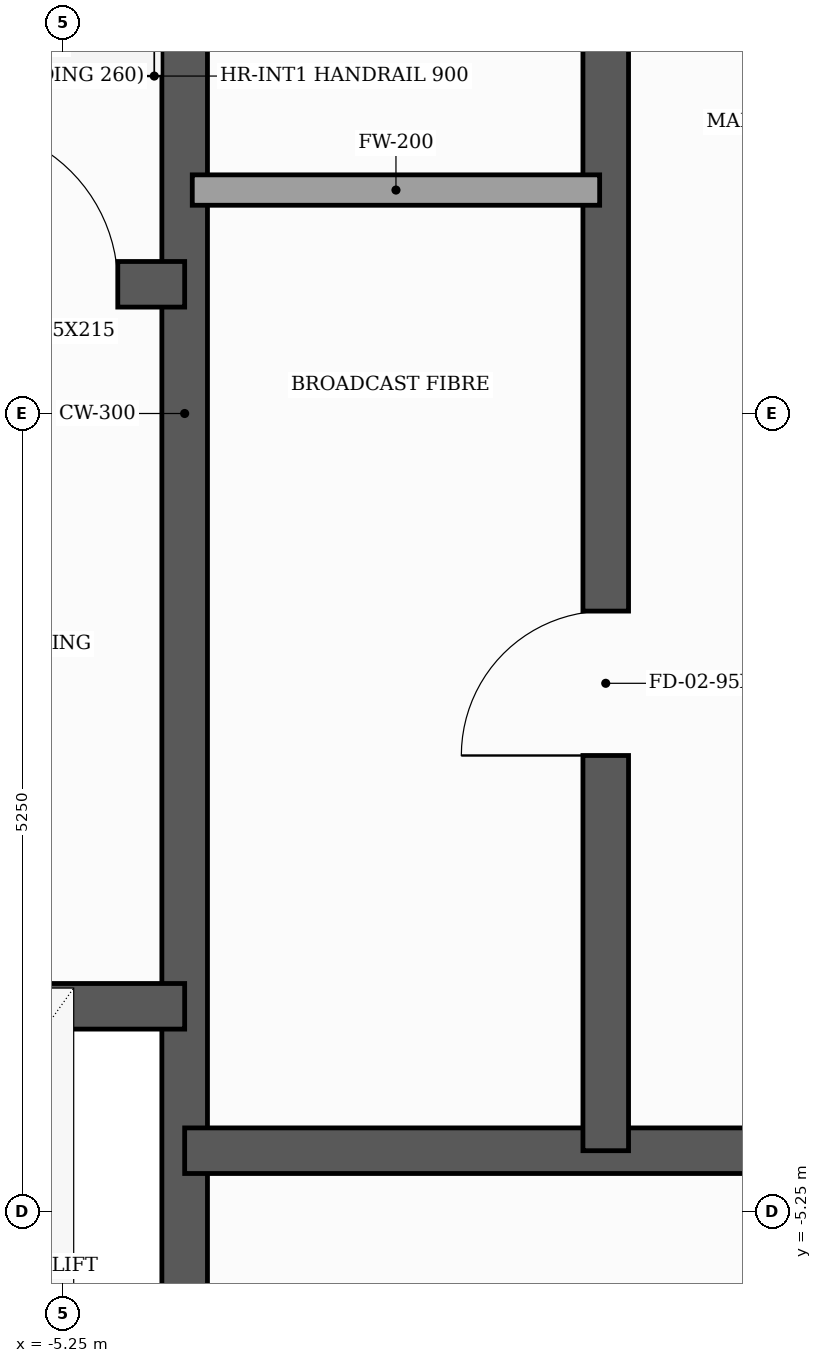
"""IFC4 building model, lengths in metres.
Left out: names, types, materials, properties, quantities, classifications, styles, units other than length and angle.
Written with IfcOpenShell. Run it as: python <this file> out.ifc"""

import sys

from ifc_helpers import new_model, si_unit, direction, frame, frame_2d, origin, place, context, subcontext, project, spatial, rectangle, extrude, element, fill, save


model = new_model("IFC4")
c1 = context("Model", 3, precision=1e-05, world=origin(), true_north=direction((0.0, 1.0)))
c2 = subcontext(c1, "Body", "Model", "MODEL_VIEW")
j1 = project(units=[si_unit("LENGTHUNIT", "METRE"), si_unit("PLANEANGLEUNIT", "RADIAN")], contexts=[c1])
p1 = place(None, origin())
s1 = spatial("IfcSite", under=j1, at=p1, CompositionType="ELEMENT")
p2 = place(p1, origin())
s2 = spatial("IfcBuilding", under=s1, at=p2, CompositionType="ELEMENT")
p3 = place(p2, frame((0.0, 0.0, 213.8)))
s3 = spatial("IfcBuildingStorey", under=s2, at=p3, CompositionType="ELEMENT", Elevation=213.8)
p4 = place(p3, frame((-4.45, -7.79, 0.0), z_axis=(0.0, 0.0, 1.0), x_axis=(0.0, 1.0, 0.0)))
e1 = element("IfcWall", 1, at=p4, inside=s3, PredefinedType="SHEAR", context=c2, shape_type="SweptSolid", body=[
    extrude(rectangle(XDim=15.58, YDim=0.3, at=frame_2d((7.79, 0.0))), origin(), (0.0, 0.0, 1.0), 4.9),
])
p5 = place(p3, frame((-7.79, 0.85, 0.0), z_axis=(0.0, 0.0, 1.0), x_axis=(1.0, 0.0, 0.0)))
e2 = element("IfcWall", 2, at=p5, inside=s3, PredefinedType="SHEAR", context=c2, shape_type="SweptSolid", body=[
    extrude(rectangle(XDim=3.34, YDim=0.3, at=frame_2d((1.67, 0.0))), origin(), (0.0, 0.0, 1.0), 4.9),
])
p6 = place(p5, frame((1.85, 0.0, 0.0)))
e3 = element("IfcOpeningElement", 3, at=p6, cuts=e2, PredefinedType="OPENING", context=c2, shape_type="SweptSolid", body=[
    extrude(rectangle(XDim=1.05, YDim=2.15, at=frame_2d((0.525, 1.075))), frame((0.0, 0.16, 0.0), z_axis=(0.0, -1.0, 0.0), x_axis=(1.0, 0.0, 0.0)), (0.0, 0.0, 1.0), 0.32),
])
p7 = place(p3, frame((-7.79, -3.9, 0.0), z_axis=(0.0, 0.0, 1.0), x_axis=(1.0, 0.0, 0.0)))
e4 = element("IfcWall", 4, at=p7, inside=s3, PredefinedType="SHEAR", context=c2, shape_type="SweptSolid", body=[
    extrude(rectangle(XDim=3.34, YDim=0.3, at=frame_2d((1.67, 0.0))), origin(), (0.0, 0.0, 1.0), 4.9),
])
p8 = place(p7, frame((1.27, 0.0, 0.0)))
e5 = element("IfcOpeningElement", 5, at=p8, cuts=e4, PredefinedType="OPENING", context=c2, shape_type="SweptSolid", body=[
    extrude(rectangle(XDim=1.1, YDim=2.1, at=frame_2d((0.55, 1.05))), frame((0.0, 0.16, 0.0), z_axis=(0.0, -1.0, 0.0), x_axis=(1.0, 0.0, 0.0)), (0.0, 0.0, 1.0), 0.32),
])
p9 = place(p3, frame((-4.45, -4.85, 0.0), z_axis=(0.0, 0.0, 1.0), x_axis=(1.0, 0.0, 0.0)))
e6 = element("IfcWall", 6, at=p9, inside=s3, PredefinedType="SHEAR", context=c2, shape_type="SweptSolid", body=[
    extrude(rectangle(XDim=8.9, YDim=0.3, at=frame_2d((4.45, 0.0))), origin(), (0.0, 0.0, 1.0), 4.9),
])
p10 = place(p3, frame((-1.68, -4.85, 0.0), z_axis=(0.0, 0.0, 1.0), x_axis=(0.0, 1.0, 0.0)))
e7 = element("IfcWall", 7, at=p10, inside=s3, PredefinedType="SHEAR", context=c2, shape_type="SweptSolid", body=[
    extrude(rectangle(XDim=12.64, YDim=0.3, at=frame_2d((6.32, 0.0))), origin(), (0.0, 0.0, 1.0), 4.9),
])
p11 = place(p10, frame((2.6, 0.0, 0.0)))
e8 = element("IfcOpeningElement", 8, at=p11, cuts=e7, PredefinedType="OPENING", context=c2, shape_type="SweptSolid", body=[
    extrude(rectangle(XDim=0.95, YDim=2.1, at=frame_2d((0.475, 1.05))), frame((0.0, 0.16, 0.0), z_axis=(0.0, -1.0, 0.0), x_axis=(1.0, 0.0, 0.0)), (0.0, 0.0, 1.0), 0.32),
])
p12 = place(p10, frame((8.8, 0.0, 0.0)))
e9 = element("IfcOpeningElement", 9, at=p12, cuts=e7, PredefinedType="OPENING", context=c2, shape_type="SweptSolid", body=[
    extrude(rectangle(XDim=0.95, YDim=2.1, at=frame_2d((0.475, 1.05))), frame((0.0, 0.16, 0.0), z_axis=(0.0, -1.0, 0.0), x_axis=(1.0, 0.0, 0.0)), (0.0, 0.0, 1.0), 0.32),
])
p13 = place(p3, frame((-4.4, 1.47, 0.0), z_axis=(0.0, 0.0, 1.0), x_axis=(1.0, 0.0, 0.0)))
e10 = element("IfcWall", 10, at=p13, inside=s3, PredefinedType="SOLIDWALL", context=c2, shape_type="SweptSolid", body=[
    extrude(rectangle(XDim=2.68, YDim=0.2, at=frame_2d((1.34, 0.0))), origin(), (0.0, 0.0, 1.0), 4.9),
])
p14 = place(p3, frame((-4.768, -26.821, 0.0), z_axis=(0.0, 0.0, 1.0), x_axis=(-0.406738743139, 0.913544522631, 0.0)))
e11 = element("IfcWall", 11, at=p14, inside=s3, PredefinedType="SOLIDWALL", context=c2, shape_type="SweptSolid", body=[
    extrude(rectangle(XDim=45.126, YDim=0.16, at=frame_2d((22.563, 0.0))), origin(), (0.0, 0.0, 1.0), 3.485),
])
p15 = place(p3, frame((25.612, 9.281, 0.0), z_axis=(0.0, 0.0, 1.0), x_axis=(-0.587784319349, -0.809017672197, 0.0)))
e12 = element("IfcWall", 12, at=p15, inside=s3, PredefinedType="SOLIDWALL", context=c2, shape_type="SweptSolid", body=[
    extrude(rectangle(XDim=45.126, YDim=0.16, at=frame_2d((22.563, 0.0))), origin(), (0.0, 0.0, 1.0), 3.485),
])
p16 = place(p6, origin())
e13 = element("IfcDoor", 13, at=p16, inside=s3, OperationType="SINGLE_SWING_LEFT", PredefinedType="DOOR", context=c2, shape_type="SweptSolid", body=[
    extrude(rectangle(XDim=1.05, YDim=2.15, at=frame_2d((0.525, 1.075))), frame((0.0, 0.025, 0.0), z_axis=(0.0, -1.0, 0.0), x_axis=(1.0, 0.0, 0.0)), (0.0, 0.0, 1.0), 0.05),
])
fill(e3, e13)
p17 = place(p11, origin())
e14 = element("IfcDoor", 14, at=p17, inside=s3, OperationType="SINGLE_SWING_LEFT", PredefinedType="DOOR", context=c2, shape_type="SweptSolid", body=[
    extrude(rectangle(XDim=0.95, YDim=2.1, at=frame_2d((0.475, 1.05))), frame((0.0, 0.025, 0.0), z_axis=(0.0, -1.0, 0.0), x_axis=(1.0, 0.0, 0.0)), (0.0, 0.0, 1.0), 0.05),
])
fill(e8, e14)
save(model, sys.argv[1])
